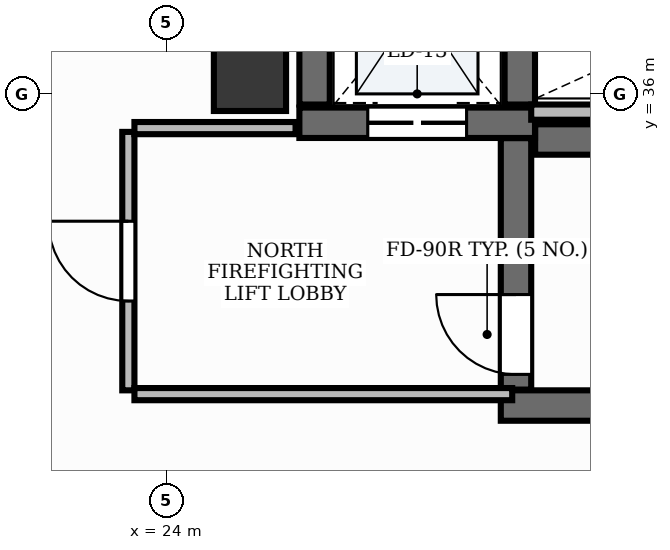
"""IFC4 building model, lengths in metres.
Left out: names, types, materials, properties, quantities, classifications, styles, units other than length and angle.
Written with IfcOpenShell. Run it as: python <this file> out.ifc"""

import sys

from ifc_helpers import new_model, si_unit, direction, frame, frame_2d, origin, origin_2d, place, context, subcontext, project, spatial, rectangle, extrude, element, fill, save


model = new_model("IFC4")
c1 = context("Model", 3, precision=1e-05, world=origin(), true_north=direction((0.0, 1.0)))
c2 = subcontext(c1, "Body", "Model", "MODEL_VIEW")
j1 = project(units=[si_unit("LENGTHUNIT", "METRE"), si_unit("PLANEANGLEUNIT", "RADIAN")], contexts=[c1])
p1 = place(None, origin())
s1 = spatial("IfcSite", under=j1, at=p1, CompositionType="ELEMENT")
p2 = place(p1, origin())
s2 = spatial("IfcBuilding", under=s1, at=p2, CompositionType="ELEMENT")
p3 = place(p2, frame((0.0, 0.0, 179.4)))
s3 = spatial("IfcBuildingStorey", under=s2, at=p3, CompositionType="ELEMENT", Elevation=179.4)
p4 = place(p3, frame((28.852, 35.4, 0.0), z_axis=(0.0, 0.0, 1.0), x_axis=(1.0, 0.0, 0.0)))
e1 = element("IfcWall", 1, at=p4, inside=s3, PredefinedType="SHEAR", context=c2, shape_type="SweptSolid", body=[
    extrude(rectangle(XDim=8.198, YDim=0.4, at=frame_2d((4.099, 0.0))), origin(), (0.0, 0.0, 1.0), 3.9),
])
p5 = place(p3, frame((28.4, 31.9, 0.0), z_axis=(0.0, 0.0, 1.0), x_axis=(1.0, 0.0, 0.0)))
e2 = element("IfcWall", 2, at=p5, inside=s3, PredefinedType="SHEAR", context=c2, shape_type="SweptSolid", body=[
    extrude(rectangle(XDim=8.65, YDim=0.4, at=frame_2d((4.325, 0.0))), origin(), (0.0, 0.0, 1.0), 3.9),
])
p6 = place(p3, frame((28.6, 32.11, 0.0), z_axis=(0.0, 0.0, 1.0), x_axis=(0.0, 1.0, 0.0)))
e3 = element("IfcWall", 3, at=p6, inside=s3, PredefinedType="SHEAR", context=c2, shape_type="SweptSolid", body=[
    extrude(rectangle(XDim=3.308, YDim=0.4, at=frame_2d((1.654, 0.0))), origin(), (0.0, 0.0, 1.0), 3.9),
])
p7 = place(p6, frame((0.2, 0.0, 0.0)))
e4 = element("IfcOpeningElement", 4, at=p7, cuts=e3, PredefinedType="OPENING", context=c2, shape_type="SweptSolid", body=[
    extrude(rectangle(XDim=1.05, YDim=2.15, at=frame_2d((0.525, 1.075))), frame((0.0, 0.215, 0.0), z_axis=(0.0, -1.0, 0.0), x_axis=(1.0, 0.0, 0.0)), (0.0, 0.0, 1.0), 0.43),
])
p8 = place(p3, frame((25.75, 35.62, 0.0), z_axis=(0.0, 0.0, 1.0), x_axis=(1.0, 0.0, 0.0)))
e5 = element("IfcWall", 5, at=p8, inside=s3, PredefinedType="SHEAR", context=c2, shape_type="SweptSolid", body=[
    extrude(rectangle(XDim=3.1, YDim=0.4, at=frame_2d((1.55, 0.0))), origin(), (0.0, 0.0, 1.0), 3.9),
])
p9 = place(p8, frame((0.9, 0.0, 0.0)))
e6 = element("IfcOpeningElement", 6, at=p9, cuts=e5, PredefinedType="OPENING", context=c2, shape_type="SweptSolid", body=[
    extrude(rectangle(XDim=1.3, YDim=2.2, at=frame_2d((0.65, 1.1))), frame((0.0, 0.215, 0.0), z_axis=(0.0, -1.0, 0.0), x_axis=(1.0, 0.0, 0.0)), (0.0, 0.0, 1.0), 0.43),
])
for number, where, z_axis, x_axis in (
    (7, (25.95, 35.86, 0.0), (0.0, 0.0, 1.0), (0.0, 1.0, 0.0)),
    (8, (28.65, 35.86, 0.0), (0.0, 0.0, 1.0), (0.0, 1.0, 0.0)),
):
    element("IfcWall", number, at=place(p3, frame(where, z_axis=z_axis, x_axis=x_axis)), inside=s3, PredefinedType="SHEAR", context=c2, shape_type="SweptSolid", body=[
        extrude(rectangle(XDim=2.7, YDim=0.4, at=frame_2d((1.35, 0.0))), origin(), (0.0, 0.0, 1.0), 3.9),
    ])
p10 = place(p3, frame((25.1, 36.25, -0.0), z_axis=(0.0, 0.0, 1.0), x_axis=(1.0, 0.0, 0.0)))
e9 = element("IfcColumn", 9, at=p10, inside=s3, PredefinedType="PILASTER", context=c2, shape_type="SweptSolid", body=[
    extrude(rectangle(XDim=0.95, YDim=0.95, at=origin_2d()), origin(), (0.0, 0.0, 1.0), 3.901),
])
p11 = place(p3, frame((28.8, 35.76, 0.0), z_axis=(0.0, 0.0, 1.0), x_axis=(1.0, 0.0, 0.0)))
e10 = element("IfcWall", 10, at=p11, inside=s3, PredefinedType="PARTITIONING", context=c2, shape_type="SweptSolid", body=[
    extrude(rectangle(XDim=4.57, YDim=0.2, at=frame_2d((2.285, 0.0))), origin(), (0.0, 0.0, 1.0), 2.91),
])
p12 = place(p3, frame((23.5, 32.1, 0.0), z_axis=(0.0, 0.0, 1.0), x_axis=(0.0, 1.0, 0.0)))
e11 = element("IfcWall", 11, at=p12, inside=s3, PredefinedType="PARTITIONING", context=c2, shape_type="SweptSolid", body=[
    extrude(rectangle(XDim=3.4, YDim=0.16, at=frame_2d((1.7, 0.0))), origin(), (0.0, 0.0, 1.0), 2.91),
])
p13 = place(p12, frame((1.175, 0.0, 0.0)))
e12 = element("IfcOpeningElement", 12, at=p13, cuts=e11, PredefinedType="OPENING", context=c2, shape_type="SweptSolid", body=[
    extrude(rectangle(XDim=1.05, YDim=2.15, at=frame_2d((0.525, 1.075))), frame((0.0, 0.095, 0.0), z_axis=(0.0, -1.0, 0.0), x_axis=(1.0, 0.0, 0.0)), (0.0, 0.0, 1.0), 0.19),
])
p14 = place(p3, frame((23.58, 32.05, 0.0), z_axis=(0.0, 0.0, 1.0), x_axis=(1.0, 0.0, 0.0)))
e13 = element("IfcWall", 13, at=p14, inside=s3, PredefinedType="PARTITIONING", context=c2, shape_type="SweptSolid", body=[
    extrude(rectangle(XDim=4.97, YDim=0.16, at=frame_2d((2.485, 0.0))), origin(), (0.0, 0.0, 1.0), 2.91),
])
p15 = place(p3, frame((23.58, 35.55, 0.0), z_axis=(0.0, 0.0, 1.0), x_axis=(1.0, 0.0, 0.0)))
e14 = element("IfcWall", 14, at=p15, inside=s3, PredefinedType="PARTITIONING", context=c2, shape_type="SweptSolid", body=[
    extrude(rectangle(XDim=2.12, YDim=0.16, at=frame_2d((1.06, 0.0))), origin(), (0.0, 0.0, 1.0), 2.91),
])
p16 = place(p7, origin())
e15 = element("IfcDoor", 15, at=p16, inside=s3, OperationType="SINGLE_SWING_RIGHT", PredefinedType="DOOR", context=c2, shape_type="SweptSolid", body=[
    extrude(rectangle(XDim=1.05, YDim=2.15, at=frame_2d((0.525, 1.075))), frame((0.0, 0.025, 0.0), z_axis=(0.0, -1.0, 0.0), x_axis=(1.0, 0.0, 0.0)), (0.0, 0.0, 1.0), 0.05),
])
fill(e4, e15)
p17 = place(p9, origin())
e16 = element("IfcDoor", 16, at=p17, inside=s3, OperationType="DOUBLE_DOOR_SLIDING", PredefinedType="DOOR", context=c2, shape_type="SweptSolid", body=[
    extrude(rectangle(XDim=1.3, YDim=2.2, at=frame_2d((0.65, 1.1))), frame((0.0, 0.025, 0.0), z_axis=(0.0, -1.0, 0.0), x_axis=(1.0, 0.0, 0.0)), (0.0, 0.0, 1.0), 0.05),
])
fill(e6, e16)
p18 = place(p13, origin())
e17 = element("IfcDoor", 17, at=p18, inside=s3, OperationType="SINGLE_SWING_RIGHT", PredefinedType="DOOR", context=c2, shape_type="SweptSolid", body=[
    extrude(rectangle(XDim=1.05, YDim=2.15, at=frame_2d((0.525, 1.075))), frame((0.0, 0.025, 0.0), z_axis=(0.0, -1.0, 0.0), x_axis=(1.0, 0.0, 0.0)), (0.0, 0.0, 1.0), 0.05),
])
fill(e12, e17)
save(model, sys.argv[1])
